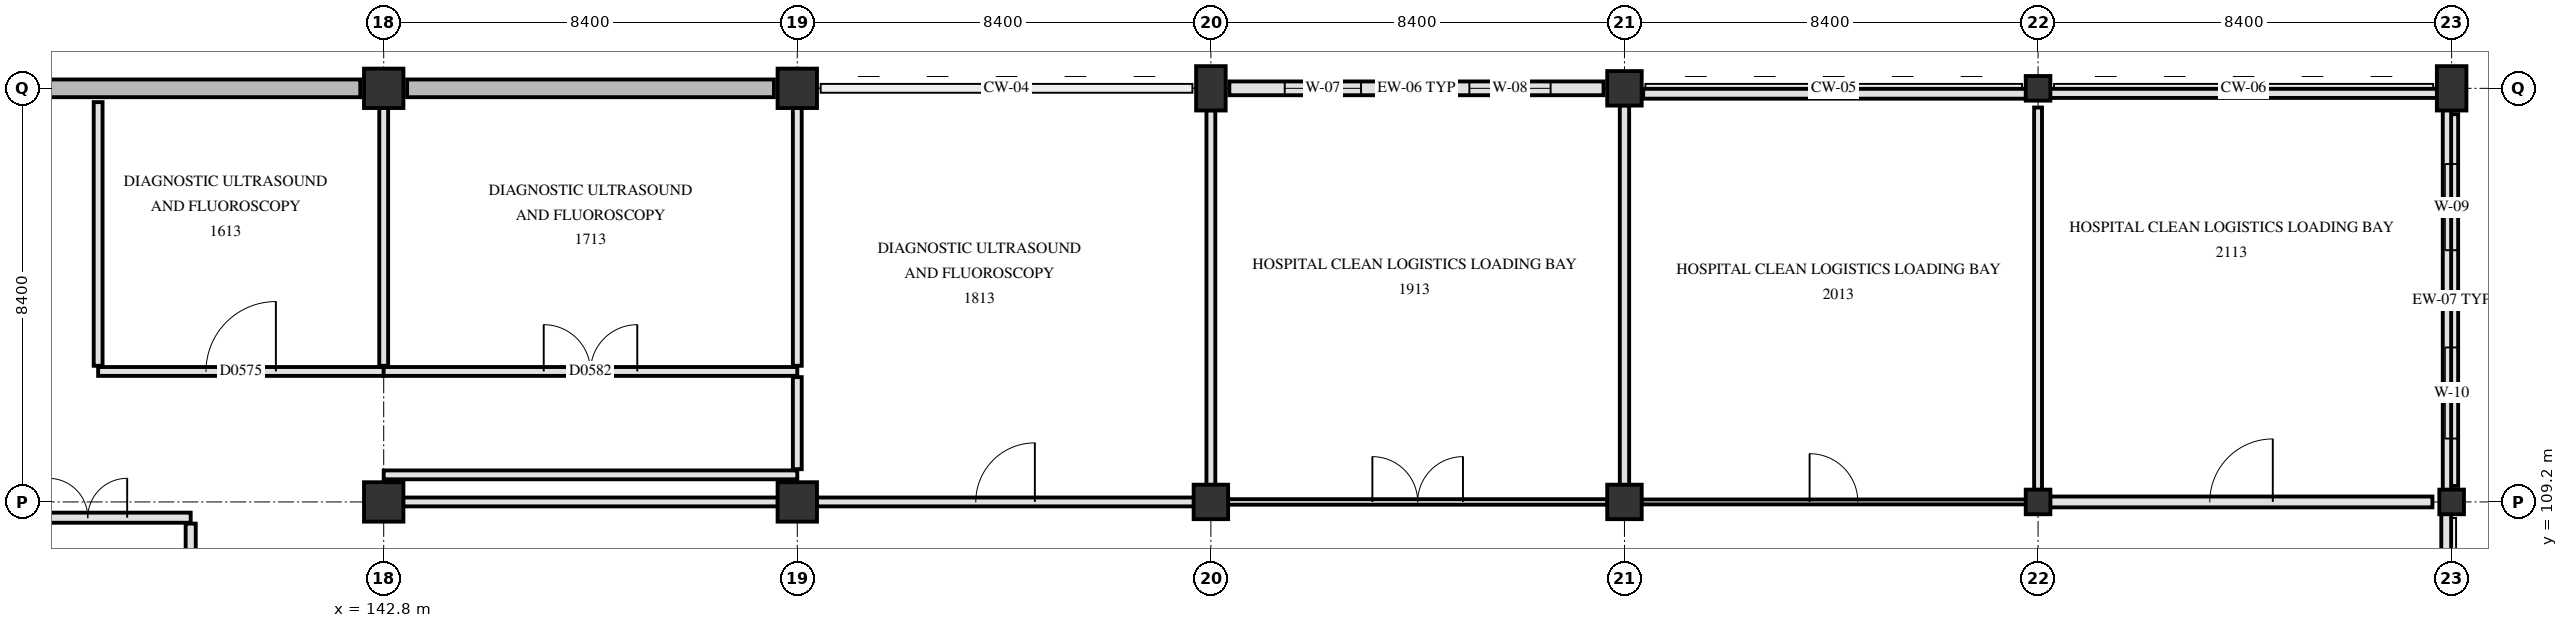
"""IFC4 building model, lengths in metres.
Left out: names, types, materials, properties, quantities, classifications, styles, units other than length and angle.
Written with IfcOpenShell. Run it as: python <this file> out.ifc"""

import sys

from ifc_helpers import new_model, si_unit, direction, frame, frame_2d, origin, origin_2d, place, context, subcontext, project, spatial, rectangle, extrude, element, fill, save


model = new_model("IFC4")
c1 = context("Model", 3, precision=1e-05, world=origin(), true_north=direction((0.0, 1.0)))
c2 = subcontext(c1, "Body", "Model", "MODEL_VIEW")
j1 = project(units=[si_unit("LENGTHUNIT", "METRE"), si_unit("PLANEANGLEUNIT", "RADIAN")], contexts=[c1])
p1 = place(None, origin())
s1 = spatial("IfcSite", under=j1, at=p1, CompositionType="ELEMENT")
p2 = place(p1, origin())
s2 = spatial("IfcBuilding", under=s1, at=p2, CompositionType="ELEMENT")
p3 = place(p2, origin())
s3 = spatial("IfcBuildingStorey", under=s2, at=p3, CompositionType="ELEMENT", Elevation=0.0)
for number, where, z_axis, x_axis in (
    (1, (142.8, 109.2, 0.0), (0.0, 0.0, 1.0), (1.0, 0.0, 0.0)),
    (2, (142.8, 117.6, 0.0), (0.0, 0.0, 1.0), (1.0, 0.0, 0.0)),
    (3, (151.2, 109.2, 0.0), (0.0, 0.0, 1.0), (1.0, 0.0, 0.0)),
    (4, (151.2, 117.6, 0.0), (0.0, 0.0, 1.0), (1.0, 0.0, 0.0)),
):
    element("IfcColumn", number, at=place(p3, frame(where, z_axis=z_axis, x_axis=x_axis)), inside=s3, PredefinedType="COLUMN", context=c2, shape_type="SweptSolid", body=[
        extrude(rectangle(XDim=0.8, YDim=0.8, at=origin_2d()), origin(), (0.0, 0.0, 1.0), 4.8),
    ])
p4 = place(p3, frame((159.6, 109.2, 0.0), z_axis=(0.0, 0.0, 1.0), x_axis=(1.0, 0.0, 0.0)))
e5 = element("IfcColumn", 5, at=p4, inside=s3, PredefinedType="COLUMN", context=c2, shape_type="SweptSolid", body=[
    extrude(rectangle(XDim=0.7, YDim=0.7, at=origin_2d()), origin(), (0.0, 0.0, 1.0), 4.8),
])
p5 = place(p3, frame((159.6, 117.6, 0.0), z_axis=(0.0, 0.0, 1.0), x_axis=(1.0, 0.0, 0.0)))
e6 = element("IfcColumn", 6, at=p5, inside=s3, PredefinedType="PILASTER", context=c2, shape_type="SweptSolid", body=[
    extrude(rectangle(XDim=0.6, YDim=0.9, at=origin_2d()), origin(), (0.0, 0.0, 1.0), 4.8),
])
for number, where, z_axis, x_axis in (
    (7, (168.0, 109.2, 0.0), (0.0, 0.0, 1.0), (1.0, 0.0, 0.0)),
    (8, (168.0, 117.6, 0.0), (0.0, 0.0, 1.0), (1.0, 0.0, 0.0)),
):
    element("IfcColumn", number, at=place(p3, frame(where, z_axis=z_axis, x_axis=x_axis)), inside=s3, PredefinedType="COLUMN", context=c2, shape_type="SweptSolid", body=[
        extrude(rectangle(XDim=0.7, YDim=0.7, at=origin_2d()), origin(), (0.0, 0.0, 1.0), 4.8),
    ])
for number, where, z_axis, x_axis in (
    (9, (176.4, 109.2, 0.0), (0.0, 0.0, 1.0), (1.0, 0.0, 0.0)),
    (10, (176.4, 117.6, 0.0), (0.0, 0.0, 1.0), (1.0, 0.0, 0.0)),
    (11, (184.8, 109.2, 0.0), (0.0, 0.0, 1.0), (1.0, 0.0, 0.0)),
):
    element("IfcColumn", number, at=place(p3, frame(where, z_axis=z_axis, x_axis=x_axis)), inside=s3, PredefinedType="COLUMN", context=c2, shape_type="SweptSolid", body=[
        extrude(rectangle(XDim=0.5, YDim=0.5, at=origin_2d()), origin(), (0.0, 0.0, 1.0), 4.8),
    ])
p6 = place(p3, frame((184.8, 117.6, 0.0), z_axis=(0.0, 0.0, 1.0), x_axis=(1.0, 0.0, 0.0)))
e12 = element("IfcColumn", 12, at=p6, inside=s3, PredefinedType="PILASTER", context=c2, shape_type="SweptSolid", body=[
    extrude(rectangle(XDim=0.6, YDim=0.9, at=origin_2d()), origin(), (0.0, 0.0, 1.0), 4.8),
])
p7 = place(p3, frame((134.775, 117.6, 0.0), z_axis=(0.0, 0.0, 1.0), x_axis=(1.0, 0.0, 0.0)))
e13 = element("IfcWall", 13, at=p7, inside=s3, PredefinedType="SOLIDWALL", context=c2, shape_type="SweptSolid", body=[
    extrude(rectangle(XDim=7.55, YDim=0.36, at=frame_2d((3.775, 0.0))), origin(), (0.0, 0.0, 1.0), 4.5),
])
p8 = place(p3, frame((143.275, 117.6, 0.0), z_axis=(0.0, 0.0, 1.0), x_axis=(1.0, 0.0, 0.0)))
e14 = element("IfcWall", 14, at=p8, inside=s3, PredefinedType="SOLIDWALL", context=c2, shape_type="SweptSolid", body=[
    extrude(rectangle(XDim=7.45, YDim=0.36, at=frame_2d((3.725, 0.0))), origin(), (0.0, 0.0, 1.0), 4.5),
])
p9 = place(p3, frame((159.975, 117.6, 0.0), z_axis=(0.0, 0.0, 1.0), x_axis=(1.0, 0.0, 0.0)))
e15 = element("IfcWall", 15, at=p9, inside=s3, PredefinedType="SOLIDWALL", context=c2, shape_type="SweptSolid", body=[
    extrude(rectangle(XDim=7.6, YDim=0.28, at=frame_2d((3.8, 0.0))), origin(), (0.0, 0.0, 1.0), 3.79),
])
p10 = place(p9, frame((1.125, 0.0, 0.85)))
e16 = element("IfcOpeningElement", 16, at=p10, cuts=e15, PredefinedType="OPENING", context=c2, shape_type="SweptSolid", body=[
    extrude(rectangle(XDim=1.55, YDim=1.3, at=frame_2d((0.775, 0.65))), frame((0.0, 0.15, 0.0), z_axis=(0.0, -1.0, 0.0), x_axis=(1.0, 0.0, 0.0)), (0.0, 0.0, 1.0), 0.3),
])
p11 = place(p9, frame((4.875, 0.0, 0.85)))
e17 = element("IfcOpeningElement", 17, at=p11, cuts=e15, PredefinedType="OPENING", context=c2, shape_type="SweptSolid", body=[
    extrude(rectangle(XDim=1.65, YDim=1.3, at=frame_2d((0.825, 0.65))), frame((0.0, 0.15, 0.0), z_axis=(0.0, -1.0, 0.0), x_axis=(1.0, 0.0, 0.0)), (0.0, 0.0, 1.0), 0.3),
])
p12 = place(p3, frame((184.8, 117.075, 0.0), z_axis=(0.0, 0.0, 1.0), x_axis=(0.0, -1.0, 0.0)))
e18 = element("IfcWall", 18, at=p12, inside=s3, PredefinedType="SOLIDWALL", context=c2, shape_type="SweptSolid", body=[
    extrude(rectangle(XDim=7.55, YDim=0.265, at=frame_2d((3.775, 0.0))), origin(), (0.0, 0.0, 1.0), 3.79),
])
p13 = place(p12, frame((1.012, 0.0, 0.85)))
e19 = element("IfcOpeningElement", 19, at=p13, cuts=e18, PredefinedType="OPENING", context=c2, shape_type="SweptSolid", body=[
    extrude(rectangle(XDim=1.75, YDim=1.3, at=frame_2d((0.875, 0.65))), frame((0.0, 0.142, 0.0), z_axis=(0.0, -1.0, 0.0), x_axis=(1.0, 0.0, 0.0)), (0.0, 0.0, 1.0), 0.285),
])
p14 = place(p12, frame((4.738, 0.0, 0.85)))
e20 = element("IfcOpeningElement", 20, at=p14, cuts=e18, PredefinedType="OPENING", context=c2, shape_type="SweptSolid", body=[
    extrude(rectangle(XDim=1.85, YDim=1.3, at=frame_2d((0.925, 0.65))), frame((0.0, 0.142, 0.0), z_axis=(0.0, -1.0, 0.0), x_axis=(1.0, 0.0, 0.0)), (0.0, 0.0, 1.0), 0.285),
])
p15 = place(p3, frame((168.38, 117.49, 4.78), z_axis=(0.0, 0.0, 1.0), x_axis=(1.0, 0.0, 0.0)))
e21 = element("IfcWall", 21, at=p15, inside=s3, PredefinedType="PARAPET", context=c2, shape_type="SweptSolid", body=[
    extrude(rectangle(XDim=8.02, YDim=0.2, at=frame_2d((4.01, 0.0))), origin(), (0.0, 0.0, 1.0), 1.17),
])
p16 = place(p3, frame((176.4, 117.498, 4.78), z_axis=(0.0, 0.0, 1.0), x_axis=(1.0, 0.0, 0.0)))
e22 = element("IfcWall", 22, at=p16, inside=s3, PredefinedType="PARAPET", context=c2, shape_type="SweptSolid", body=[
    extrude(rectangle(XDim=8.4, YDim=0.185, at=frame_2d((4.2, 0.0))), origin(), (0.0, 0.0, 1.0), 1.17),
])
p17 = place(p3, frame((184.705, 117.6, 4.78), z_axis=(0.0, 0.0, 1.0), x_axis=(0.0, -1.0, 0.0)))
e23 = element("IfcWall", 23, at=p17, inside=s3, PredefinedType="PARAPET", context=c2, shape_type="SweptSolid", body=[
    extrude(rectangle(XDim=8.4, YDim=0.17, at=frame_2d((4.2, 0.0))), origin(), (0.0, 0.0, 1.0), 1.17),
])
p18 = place(p3, frame((184.69, 109.2, 4.78), z_axis=(0.0, 0.0, 1.0), x_axis=(0.0, -1.0, 0.0)))
e24 = element("IfcWall", 24, at=p18, inside=s3, PredefinedType="PARAPET", context=c2, shape_type="SweptSolid", body=[
    extrude(rectangle(XDim=8.4, YDim=0.2, at=frame_2d((4.2, 0.0))), origin(), (0.0, 0.0, 1.0), 1.17),
])
p19 = place(p3, frame((138.88, 104.64, 0.0), z_axis=(0.0, 0.0, 1.0), x_axis=(0.0, 1.0, 0.0)))
e25 = element("IfcWall", 25, at=p19, inside=s3, PredefinedType="PARTITIONING", context=c2, shape_type="SweptSolid", body=[
    extrude(rectangle(XDim=4.12, YDim=0.205, at=frame_2d((2.06, 0.0))), origin(), (0.0, 0.0, 1.0), 4.49),
])
p20 = place(p3, frame((134.7, 108.88, 0.0), z_axis=(0.0, 0.0, 1.0), x_axis=(1.0, 0.0, 0.0)))
e26 = element("IfcWall", 26, at=p20, inside=s3, PredefinedType="PARTITIONING", context=c2, shape_type="SweptSolid", body=[
    extrude(rectangle(XDim=4.18, YDim=0.205, at=frame_2d((2.09, 0.0))), origin(), (0.0, 0.0, 1.0), 3.84),
])
p21 = place(p20, frame((1.29, 0.0, 0.0)))
e27 = element("IfcOpeningElement", 27, at=p21, cuts=e26, PredefinedType="OPENING", context=c2, shape_type="SweptSolid", body=[
    extrude(rectangle(XDim=1.6, YDim=2.25, at=frame_2d((0.8, 1.125))), frame((0.0, 0.113, 0.0), z_axis=(0.0, -1.0, 0.0), x_axis=(1.0, 0.0, 0.0)), (0.0, 0.0, 1.0), 0.225),
])
p22 = place(p3, frame((143.195, 109.2, 0.0), z_axis=(0.0, 0.0, 1.0), x_axis=(1.0, 0.0, 0.0)))
e28 = element("IfcWall", 28, at=p22, inside=s3, PredefinedType="PARTITIONING", context=c2, shape_type="SweptSolid", body=[
    extrude(rectangle(XDim=7.61, YDim=0.18, at=frame_2d((3.805, 0.0))), origin(), (0.0, 0.0, 1.0), 3.84),
])
p23 = place(p3, frame((151.595, 109.2, 0.0), z_axis=(0.0, 0.0, 1.0), x_axis=(1.0, 0.0, 0.0)))
e29 = element("IfcWall", 29, at=p23, inside=s3, PredefinedType="PARTITIONING", context=c2, shape_type="SweptSolid", body=[
    extrude(rectangle(XDim=7.66, YDim=0.18, at=frame_2d((3.83, 0.0))), origin(), (0.0, 0.0, 1.0), 3.84),
])
p24 = place(p23, frame((3.23, 0.0, 0.0)))
e30 = element("IfcOpeningElement", 30, at=p24, cuts=e29, PredefinedType="OPENING", context=c2, shape_type="SweptSolid", body=[
    extrude(rectangle(XDim=1.2, YDim=2.15, at=frame_2d((0.6, 1.075))), frame((0.0, 0.1, 0.0), z_axis=(0.0, -1.0, 0.0), x_axis=(1.0, 0.0, 0.0)), (0.0, 0.0, 1.0), 0.2),
])
p25 = place(p3, frame((159.945, 109.2, 0.0), z_axis=(0.0, 0.0, 1.0), x_axis=(1.0, 0.0, 0.0)))
e31 = element("IfcWall", 31, at=p25, inside=s3, PredefinedType="PARTITIONING", context=c2, shape_type="SweptSolid", body=[
    extrude(rectangle(XDim=7.71, YDim=0.112, at=frame_2d((3.855, 0.0))), origin(), (0.0, 0.0, 1.0), 3.84),
])
p26 = place(p25, frame((2.935, 0.0, 0.0)))
e32 = element("IfcOpeningElement", 32, at=p26, cuts=e31, PredefinedType="OPENING", context=c2, shape_type="SweptSolid", body=[
    extrude(rectangle(XDim=1.84, YDim=2.28, at=frame_2d((0.92, 1.14))), frame((0.0, 0.066, 0.0), z_axis=(0.0, -1.0, 0.0), x_axis=(1.0, 0.0, 0.0)), (0.0, 0.0, 1.0), 0.132),
])
p27 = place(p3, frame((168.345, 109.2, 0.0), z_axis=(0.0, 0.0, 1.0), x_axis=(1.0, 0.0, 0.0)))
e33 = element("IfcWall", 33, at=p27, inside=s3, PredefinedType="PARTITIONING", context=c2, shape_type="SweptSolid", body=[
    extrude(rectangle(XDim=7.81, YDim=0.1, at=frame_2d((3.905, 0.0))), origin(), (0.0, 0.0, 1.0), 3.84),
])
p28 = place(p27, frame((3.415, 0.0, 0.0)))
e34 = element("IfcOpeningElement", 34, at=p28, cuts=e33, PredefinedType="OPENING", context=c2, shape_type="SweptSolid", body=[
    extrude(rectangle(XDim=0.98, YDim=2.12, at=frame_2d((0.49, 1.06))), frame((0.0, 0.06, 0.0), z_axis=(0.0, -1.0, 0.0), x_axis=(1.0, 0.0, 0.0)), (0.0, 0.0, 1.0), 0.12),
])
p29 = place(p3, frame((176.645, 109.2, 0.0), z_axis=(0.0, 0.0, 1.0), x_axis=(1.0, 0.0, 0.0)))
e35 = element("IfcWall", 35, at=p29, inside=s3, PredefinedType="PARTITIONING", context=c2, shape_type="SweptSolid", body=[
    extrude(rectangle(XDim=7.765, YDim=0.22, at=frame_2d((3.882, 0.0))), origin(), (0.0, 0.0, 1.0), 3.84),
])
p30 = place(p29, frame((3.242, 0.0, 0.0)))
e36 = element("IfcOpeningElement", 36, at=p30, cuts=e35, PredefinedType="OPENING", context=c2, shape_type="SweptSolid", body=[
    extrude(rectangle(XDim=1.28, YDim=2.18, at=frame_2d((0.64, 1.09))), frame((0.0, 0.12, 0.0), z_axis=(0.0, -1.0, 0.0), x_axis=(1.0, 0.0, 0.0)), (0.0, 0.0, 1.0), 0.24),
])
p31 = place(p3, frame((142.8, 109.75, 0.0), z_axis=(0.0, 0.0, 1.0), x_axis=(1.0, 0.0, 0.0)))
e37 = element("IfcWall", 37, at=p31, inside=s3, PredefinedType="PARTITIONING", context=c2, shape_type="SweptSolid", body=[
    extrude(rectangle(XDim=8.4, YDim=0.18, at=frame_2d((4.2, 0.0))), origin(), (0.0, 0.0, 1.0), 3.89),
])
p32 = place(p3, frame((137.0, 111.85, 0.0), z_axis=(0.0, 0.0, 1.0), x_axis=(1.0, 0.0, 0.0)))
e38 = element("IfcWall", 38, at=p32, inside=s3, PredefinedType="PARTITIONING", context=c2, shape_type="SweptSolid", body=[
    extrude(rectangle(XDim=5.8, YDim=0.18, at=frame_2d((2.9, 0.0))), origin(), (0.0, 0.0, 1.0), 3.89),
])
p33 = place(p32, frame((2.19, 0.0, 0.0)))
e39 = element("IfcOpeningElement", 39, at=p33, cuts=e38, PredefinedType="OPENING", context=c2, shape_type="SweptSolid", body=[
    extrude(rectangle(XDim=1.42, YDim=2.22, at=frame_2d((0.71, 1.11))), frame((0.0, 0.1, 0.0), z_axis=(0.0, -1.0, 0.0), x_axis=(1.0, 0.0, 0.0)), (0.0, 0.0, 1.0), 0.2),
])
p34 = place(p3, frame((142.8, 111.85, 0.0), z_axis=(0.0, 0.0, 1.0), x_axis=(1.0, 0.0, 0.0)))
e40 = element("IfcWall", 40, at=p34, inside=s3, PredefinedType="PARTITIONING", context=c2, shape_type="SweptSolid", body=[
    extrude(rectangle(XDim=8.4, YDim=0.18, at=frame_2d((4.2, 0.0))), origin(), (0.0, 0.0, 1.0), 3.89),
])
p35 = place(p34, frame((3.25, 0.0, 0.0)))
e41 = element("IfcOpeningElement", 41, at=p35, cuts=e40, PredefinedType="OPENING", context=c2, shape_type="SweptSolid", body=[
    extrude(rectangle(XDim=1.9, YDim=2.3, at=frame_2d((0.95, 1.15))), frame((0.0, 0.1, 0.0), z_axis=(0.0, -1.0, 0.0), x_axis=(1.0, 0.0, 0.0)), (0.0, 0.0, 1.0), 0.2),
])
p36 = place(p3, frame((137.0, 111.965, 0.0), z_axis=(0.0, 0.0, 1.0), x_axis=(0.0, 1.0, 0.0)))
e42 = element("IfcWall", 42, at=p36, inside=s3, PredefinedType="PARTITIONING", context=c2, shape_type="SweptSolid", body=[
    extrude(rectangle(XDim=5.355, YDim=0.18, at=frame_2d((2.677, 0.0))), origin(), (0.0, 0.0, 1.0), 4.49),
])
p37 = place(p3, frame((142.8, 111.965, 0.0), z_axis=(0.0, 0.0, 1.0), x_axis=(0.0, 1.0, 0.0)))
e43 = element("IfcWall", 43, at=p37, inside=s3, PredefinedType="PARTITIONING", context=c2, shape_type="SweptSolid", body=[
    extrude(rectangle(XDim=5.24, YDim=0.18, at=frame_2d((2.62, 0.0))), origin(), (0.0, 0.0, 1.0), 3.89),
])
p38 = place(p3, frame((151.2, 109.865, 0.0), z_axis=(0.0, 0.0, 1.0), x_axis=(0.0, 1.0, 0.0)))
e44 = element("IfcWall", 44, at=p38, inside=s3, PredefinedType="PARTITIONING", context=c2, shape_type="SweptSolid", body=[
    extrude(rectangle(XDim=1.87, YDim=0.18, at=frame_2d((0.935, 0.0))), origin(), (0.0, 0.0, 1.0), 3.89),
])
p39 = place(p3, frame((151.2, 111.965, 0.0), z_axis=(0.0, 0.0, 1.0), x_axis=(0.0, 1.0, 0.0)))
e45 = element("IfcWall", 45, at=p39, inside=s3, PredefinedType="PARTITIONING", context=c2, shape_type="SweptSolid", body=[
    extrude(rectangle(XDim=5.24, YDim=0.18, at=frame_2d((2.62, 0.0))), origin(), (0.0, 0.0, 1.0), 3.89),
])
p40 = place(p3, frame((159.6, 109.545, 0.0), z_axis=(0.0, 0.0, 1.0), x_axis=(0.0, 1.0, 0.0)))
e46 = element("IfcWall", 46, at=p40, inside=s3, PredefinedType="PARTITIONING", context=c2, shape_type="SweptSolid", body=[
    extrude(rectangle(XDim=7.61, YDim=0.18, at=frame_2d((3.805, 0.0))), origin(), (0.0, 0.0, 1.0), 3.89),
])
p41 = place(p3, frame((168.0, 109.545, 0.0), z_axis=(0.0, 0.0, 1.0), x_axis=(0.0, 1.0, 0.0)))
e47 = element("IfcWall", 47, at=p41, inside=s3, PredefinedType="PARTITIONING", context=c2, shape_type="SweptSolid", body=[
    extrude(rectangle(XDim=7.71, YDim=0.19, at=frame_2d((3.855, 0.0))), origin(), (0.0, 0.0, 1.0), 3.89),
])
p42 = place(p3, frame((176.4, 109.445, 0.0), z_axis=(0.0, 0.0, 1.0), x_axis=(0.0, 1.0, 0.0)))
e48 = element("IfcWall", 48, at=p42, inside=s3, PredefinedType="PARTITIONING", context=c2, shape_type="SweptSolid", body=[
    extrude(rectangle(XDim=7.765, YDim=0.16, at=frame_2d((3.882, 0.0))), origin(), (0.0, 0.0, 1.0), 3.89),
])
p43 = place(p10, origin())
e49 = element("IfcWindow", 49, at=p43, inside=s3, PartitioningType="SINGLE_PANEL", PredefinedType="WINDOW", context=c2, shape_type="SweptSolid", body=[
    extrude(rectangle(XDim=1.55, YDim=1.3, at=frame_2d((0.775, 0.65))), frame((0.0, 0.03, 0.0), z_axis=(0.0, -1.0, 0.0), x_axis=(1.0, 0.0, 0.0)), (0.0, 0.0, 1.0), 0.06),
])
fill(e16, e49)
p44 = place(p11, origin())
e50 = element("IfcWindow", 50, at=p44, inside=s3, PartitioningType="SINGLE_PANEL", PredefinedType="WINDOW", context=c2, shape_type="SweptSolid", body=[
    extrude(rectangle(XDim=1.65, YDim=1.3, at=frame_2d((0.825, 0.65))), frame((0.0, 0.03, 0.0), z_axis=(0.0, -1.0, 0.0), x_axis=(1.0, 0.0, 0.0)), (0.0, 0.0, 1.0), 0.06),
])
fill(e17, e50)
p45 = place(p13, origin())
e51 = element("IfcWindow", 51, at=p45, inside=s3, PartitioningType="SINGLE_PANEL", PredefinedType="WINDOW", context=c2, shape_type="SweptSolid", body=[
    extrude(rectangle(XDim=1.75, YDim=1.3, at=frame_2d((0.875, 0.65))), frame((0.0, 0.03, 0.0), z_axis=(0.0, -1.0, 0.0), x_axis=(1.0, 0.0, 0.0)), (0.0, 0.0, 1.0), 0.06),
])
fill(e19, e51)
p46 = place(p14, origin())
e52 = element("IfcWindow", 52, at=p46, inside=s3, PartitioningType="SINGLE_PANEL", PredefinedType="WINDOW", context=c2, shape_type="SweptSolid", body=[
    extrude(rectangle(XDim=1.85, YDim=1.3, at=frame_2d((0.925, 0.65))), frame((0.0, 0.03, 0.0), z_axis=(0.0, -1.0, 0.0), x_axis=(1.0, 0.0, 0.0)), (0.0, 0.0, 1.0), 0.06),
])
fill(e20, e52)
p47 = place(p21, origin())
e53 = element("IfcDoor", 53, at=p47, inside=s3, OperationType="DOUBLE_SWING_LEFT", PredefinedType="DOOR", context=c2, shape_type="SweptSolid", body=[
    extrude(rectangle(XDim=1.6, YDim=2.25, at=frame_2d((0.8, 1.125))), frame((0.0, 0.025, 0.0), z_axis=(0.0, -1.0, 0.0), x_axis=(1.0, 0.0, 0.0)), (0.0, 0.0, 1.0), 0.05),
])
fill(e27, e53)
p48 = place(p33, origin())
e54 = element("IfcDoor", 54, at=p48, inside=s3, OperationType="SINGLE_SWING_RIGHT", PredefinedType="DOOR", context=c2, shape_type="SweptSolid", body=[
    extrude(rectangle(XDim=1.42, YDim=2.22, at=frame_2d((0.71, 1.11))), frame((0.0, 0.025, 0.0), z_axis=(0.0, -1.0, 0.0), x_axis=(1.0, 0.0, 0.0)), (0.0, 0.0, 1.0), 0.05),
])
fill(e39, e54)
p49 = place(p35, origin())
e55 = element("IfcDoor", 55, at=p49, inside=s3, OperationType="DOUBLE_SWING_LEFT", PredefinedType="DOOR", context=c2, shape_type="SweptSolid", body=[
    extrude(rectangle(XDim=1.9, YDim=2.3, at=frame_2d((0.95, 1.15))), frame((0.0, 0.025, 0.0), z_axis=(0.0, -1.0, 0.0), x_axis=(1.0, 0.0, 0.0)), (0.0, 0.0, 1.0), 0.05),
])
fill(e41, e55)
p50 = place(p24, origin())
e56 = element("IfcDoor", 56, at=p50, inside=s3, OperationType="SINGLE_SWING_RIGHT", PredefinedType="DOOR", context=c2, shape_type="SweptSolid", body=[
    extrude(rectangle(XDim=1.2, YDim=2.15, at=frame_2d((0.6, 1.075))), frame((0.0, 0.025, 0.0), z_axis=(0.0, -1.0, 0.0), x_axis=(1.0, 0.0, 0.0)), (0.0, 0.0, 1.0), 0.05),
])
fill(e30, e56)
p51 = place(p26, origin())
e57 = element("IfcDoor", 57, at=p51, inside=s3, OperationType="DOUBLE_SWING_LEFT", PredefinedType="DOOR", context=c2, shape_type="SweptSolid", body=[
    extrude(rectangle(XDim=1.84, YDim=2.28, at=frame_2d((0.92, 1.14))), frame((0.0, 0.025, 0.0), z_axis=(0.0, -1.0, 0.0), x_axis=(1.0, 0.0, 0.0)), (0.0, 0.0, 1.0), 0.05),
])
fill(e32, e57)
p52 = place(p28, origin())
e58 = element("IfcDoor", 58, at=p52, inside=s3, OperationType="SINGLE_SWING_LEFT", PredefinedType="DOOR", context=c2, shape_type="SweptSolid", body=[
    extrude(rectangle(XDim=0.98, YDim=2.12, at=frame_2d((0.49, 1.06))), frame((0.0, 0.025, 0.0), z_axis=(0.0, -1.0, 0.0), x_axis=(1.0, 0.0, 0.0)), (0.0, 0.0, 1.0), 0.05),
])
fill(e34, e58)
p53 = place(p30, origin())
e59 = element("IfcDoor", 59, at=p53, inside=s3, OperationType="SINGLE_SWING_RIGHT", PredefinedType="DOOR", context=c2, shape_type="SweptSolid", body=[
    extrude(rectangle(XDim=1.28, YDim=2.18, at=frame_2d((0.64, 1.09))), frame((0.0, 0.025, 0.0), z_axis=(0.0, -1.0, 0.0), x_axis=(1.0, 0.0, 0.0)), (0.0, 0.0, 1.0), 0.05),
])
fill(e36, e59)
save(model, sys.argv[1])
